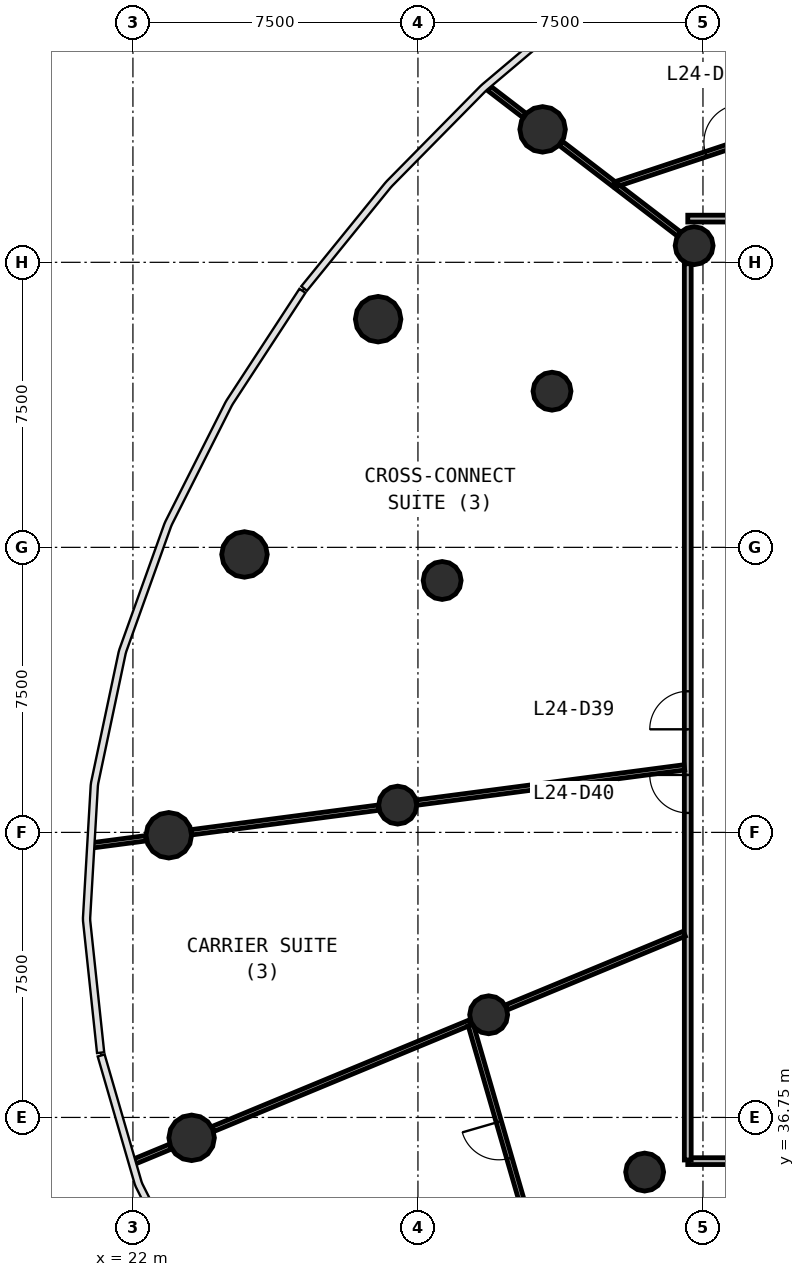
"""IFC4 building model, lengths in metres.
Left out: names, types, materials, properties, quantities, classifications, styles, units other than length and angle.
Written with IfcOpenShell. Run it as: python <this file> out.ifc"""

import sys

from ifc_helpers import new_model, si_unit, direction, frame, frame_2d, origin, origin_2d, place, context, subcontext, project, spatial, rectangle, circle, extrude, source, transform, mapped, element, fill, save


model = new_model("IFC4")
c1 = context("Model", 3, precision=1e-05, world=origin(), true_north=direction((0.0, 1.0)))
c2 = subcontext(c1, "Body", "Model", "MODEL_VIEW")
j1 = project(units=[si_unit("LENGTHUNIT", "METRE"), si_unit("PLANEANGLEUNIT", "RADIAN")], contexts=[c1])
p1 = place(None, origin())
s1 = spatial("IfcSite", under=j1, at=p1, CompositionType="ELEMENT")
p2 = place(p1, origin())
s2 = spatial("IfcBuilding", under=s1, at=p2, CompositionType="ELEMENT")
p3 = place(p2, frame((0.0, 0.0, 104.4)))
s3 = spatial("IfcBuildingStorey", under=s2, at=p3, CompositionType="ELEMENT", Elevation=104.4)
m1 = source(origin(), c2, "Body", "SweptSolid", [
    extrude(circle(Radius=0.6, at=origin_2d()), origin(), (0.0, 0.0, 1.0), 4.1),
])
for number, where, z_axis, x_axis in (
    (1, (32.78, 62.748, 0.0), (0.0, 0.0, 1.0), (1.0, 0.0, 0.0)),
    (2, (28.452, 57.754, 0.0), (0.0, 0.0, 1.0), (1.0, 0.0, 0.0)),
    (3, (24.936, 51.563, 0.0), (0.0, 0.0, 1.0), (1.0, 0.0, 0.0)),
    (4, (22.944, 44.175, 0.0), (0.0, 0.0, 1.0), (1.0, 0.0, 0.0)),
    (5, (23.544, 36.213, 0.0), (0.0, 0.0, 1.0), (1.0, 0.0, 0.0)),
):
    element("IfcColumn", number, at=place(p3, frame(where, z_axis=z_axis, x_axis=x_axis)), inside=s3, PredefinedType="COLUMN", context=c2, shape_type="MappedRepresentation", body=[
        mapped(m1, transform((0.0, 0.0, 0.0), scale=1.0)),
    ])
m2 = source(origin(), c2, "Body", "SweptSolid", [
    extrude(circle(Radius=0.5, at=origin_2d()), origin(), (0.0, 0.0, 1.0), 4.1),
])
for number, where, z_axis, x_axis in (
    (6, (36.768, 59.688, 0.0), (0.0, 0.0, 1.0), (1.0, 0.0, 0.0)),
    (7, (33.028, 55.859, 0.0), (0.0, 0.0, 1.0), (1.0, 0.0, 0.0)),
    (8, (30.137, 50.878, 0.0), (0.0, 0.0, 1.0), (1.0, 0.0, 0.0)),
    (9, (28.966, 44.968, 0.0), (0.0, 0.0, 1.0), (1.0, 0.0, 0.0)),
    (10, (31.361, 39.451, 0.0), (0.0, 0.0, 1.0), (1.0, 0.0, 0.0)),
    (11, (35.465, 35.312, 0.0), (0.0, 0.0, 1.0), (1.0, 0.0, 0.0)),
):
    element("IfcColumn", number, at=place(p3, frame(where, z_axis=z_axis, x_axis=x_axis)), inside=s3, PredefinedType="COLUMN", context=c2, shape_type="MappedRepresentation", body=[
        mapped(m2, transform((0.0, 0.0, 0.0), scale=1.0)),
    ])
p4 = place(p3, frame((67.4, 35.6, 0.0), z_axis=(0.0, 0.0, 1.0), x_axis=(-1.0, 0.0, 0.0)))
e12 = element("IfcWall", 12, at=p4, inside=s3, PredefinedType="PARTITIONING", context=c2, shape_type="SweptSolid", body=[
    extrude(rectangle(XDim=30.8, YDim=0.18, at=frame_2d((15.4, 0.0))), origin(), (0.0, 0.0, 1.0), 2.9),
])
p5 = place(p4, frame((9.05, 0.0, 0.0)))
e13 = element("IfcOpeningElement", 13, at=p5, cuts=e12, PredefinedType="OPENING", context=c2, shape_type="SweptSolid", body=[
    extrude(rectangle(XDim=0.9, YDim=2.1, at=frame_2d((0.45, 1.05))), frame((0.0, 0.1, 0.0), z_axis=(0.0, -1.0, 0.0), x_axis=(1.0, 0.0, 0.0)), (0.0, 0.0, 1.0), 0.2),
])
p6 = place(p4, frame((6.05, 0.0, 0.0)))
e14 = element("IfcOpeningElement", 14, at=p6, cuts=e12, PredefinedType="OPENING", context=c2, shape_type="SweptSolid", body=[
    extrude(rectangle(XDim=0.9, YDim=2.1, at=frame_2d((0.45, 1.05))), frame((0.0, 0.1, 0.0), z_axis=(0.0, -1.0, 0.0), x_axis=(1.0, 0.0, 0.0)), (0.0, 0.0, 1.0), 0.2),
])
p7 = place(p4, frame((2.45, 0.0, 0.0)))
e15 = element("IfcOpeningElement", 15, at=p7, cuts=e12, PredefinedType="OPENING", context=c2, shape_type="SweptSolid", body=[
    extrude(rectangle(XDim=0.9, YDim=2.1, at=frame_2d((0.45, 1.05))), frame((0.0, 0.1, 0.0), z_axis=(0.0, -1.0, 0.0), x_axis=(1.0, 0.0, 0.0)), (0.0, 0.0, 1.0), 0.2),
])
p8 = place(p4, frame((20.95, 0.0, 0.0)))
e16 = element("IfcOpeningElement", 16, at=p8, cuts=e12, PredefinedType="OPENING", context=c2, shape_type="SweptSolid", body=[
    extrude(rectangle(XDim=1.0, YDim=2.1, at=frame_2d((0.5, 1.05))), frame((0.0, 0.1, 0.0), z_axis=(0.0, -1.0, 0.0), x_axis=(1.0, 0.0, 0.0)), (0.0, 0.0, 1.0), 0.2),
])
p9 = place(p4, frame((14.95, 0.0, 0.0)))
e17 = element("IfcOpeningElement", 17, at=p9, cuts=e12, PredefinedType="OPENING", context=c2, shape_type="SweptSolid", body=[
    extrude(rectangle(XDim=1.0, YDim=2.1, at=frame_2d((0.5, 1.05))), frame((0.0, 0.1, 0.0), z_axis=(0.0, -1.0, 0.0), x_axis=(1.0, 0.0, 0.0)), (0.0, 0.0, 1.0), 0.2),
])
p10 = place(p4, frame((12.55, 0.0, 0.0)))
e18 = element("IfcOpeningElement", 18, at=p10, cuts=e12, PredefinedType="OPENING", context=c2, shape_type="SweptSolid", body=[
    extrude(rectangle(XDim=1.0, YDim=2.1, at=frame_2d((0.5, 1.05))), frame((0.0, 0.1, 0.0), z_axis=(0.0, -1.0, 0.0), x_axis=(1.0, 0.0, 0.0)), (0.0, 0.0, 1.0), 0.2),
])
p11 = place(p3, frame((36.6, 60.4, 0.0), z_axis=(0.0, 0.0, 1.0), x_axis=(1.0, 0.0, 0.0)))
e19 = element("IfcWall", 19, at=p11, inside=s3, PredefinedType="PARTITIONING", context=c2, shape_type="SweptSolid", body=[
    extrude(rectangle(XDim=30.8, YDim=0.18, at=frame_2d((15.4, 0.0))), origin(), (0.0, 0.0, 1.0), 2.9),
])
p12 = place(p11, frame((25.55, 0.0, 0.0)))
e20 = element("IfcOpeningElement", 20, at=p12, cuts=e19, PredefinedType="OPENING", context=c2, shape_type="SweptSolid", body=[
    extrude(rectangle(XDim=1.0, YDim=2.1, at=frame_2d((0.5, 1.05))), frame((0.0, 0.1, 0.0), z_axis=(0.0, -1.0, 0.0), x_axis=(1.0, 0.0, 0.0)), (0.0, 0.0, 1.0), 0.2),
])
p13 = place(p11, frame((20.95, 0.0, 0.0)))
e21 = element("IfcOpeningElement", 21, at=p13, cuts=e19, PredefinedType="OPENING", context=c2, shape_type="SweptSolid", body=[
    extrude(rectangle(XDim=1.0, YDim=2.1, at=frame_2d((0.5, 1.05))), frame((0.0, 0.1, 0.0), z_axis=(0.0, -1.0, 0.0), x_axis=(1.0, 0.0, 0.0)), (0.0, 0.0, 1.0), 0.2),
])
p14 = place(p11, frame((14.95, 0.0, 0.0)))
e22 = element("IfcOpeningElement", 22, at=p14, cuts=e19, PredefinedType="OPENING", context=c2, shape_type="SweptSolid", body=[
    extrude(rectangle(XDim=1.0, YDim=2.1, at=frame_2d((0.5, 1.05))), frame((0.0, 0.1, 0.0), z_axis=(0.0, -1.0, 0.0), x_axis=(1.0, 0.0, 0.0)), (0.0, 0.0, 1.0), 0.2),
])
p15 = place(p11, frame((8.95, 0.0, 0.0)))
e23 = element("IfcOpeningElement", 23, at=p15, cuts=e19, PredefinedType="OPENING", context=c2, shape_type="SweptSolid", body=[
    extrude(rectangle(XDim=1.0, YDim=2.1, at=frame_2d((0.5, 1.05))), frame((0.0, 0.1, 0.0), z_axis=(0.0, -1.0, 0.0), x_axis=(1.0, 0.0, 0.0)), (0.0, 0.0, 1.0), 0.2),
])
p16 = place(p3, frame((36.6, 35.63, 0.0), z_axis=(0.0, 0.0, 1.0), x_axis=(0.0, 1.0, 0.0)))
e24 = element("IfcWall", 24, at=p16, inside=s3, PredefinedType="PARTITIONING", context=c2, shape_type="SweptSolid", body=[
    extrude(rectangle(XDim=23.583, YDim=0.18, at=frame_2d((11.791, 0.0))), origin(), (0.0, 0.0, 1.0), 2.9),
])
p17 = place(p16, frame((11.333, 0.0, 0.0)))
e25 = element("IfcOpeningElement", 25, at=p17, cuts=e24, PredefinedType="OPENING", context=c2, shape_type="SweptSolid", body=[
    extrude(rectangle(XDim=1.0, YDim=2.1, at=frame_2d((0.5, 1.05))), frame((0.0, 0.1, 0.0), z_axis=(0.0, -1.0, 0.0), x_axis=(1.0, 0.0, 0.0)), (0.0, 0.0, 1.0), 0.2),
])
p18 = place(p16, frame((9.133, 0.0, 0.0)))
e26 = element("IfcOpeningElement", 26, at=p18, cuts=e24, PredefinedType="OPENING", context=c2, shape_type="SweptSolid", body=[
    extrude(rectangle(XDim=1.0, YDim=2.1, at=frame_2d((0.5, 1.05))), frame((0.0, 0.1, 0.0), z_axis=(0.0, -1.0, 0.0), x_axis=(1.0, 0.0, 0.0)), (0.0, 0.0, 1.0), 0.2),
])
p19 = place(p3, frame((30.87, 39.248, 0.0), z_axis=(0.0, 0.0, 1.0), x_axis=(-0.923871790576, -0.382702122514, 0.0)))
e27 = element("IfcWall", 27, at=p19, inside=s3, PredefinedType="PARTITIONING", context=c2, shape_type="SweptSolid", body=[
    extrude(rectangle(XDim=7.324, YDim=0.14, at=frame_2d((3.662, 0.0))), origin(), (0.0, 0.0, 1.0), 2.9),
])
p20 = place(p3, frame((36.51, 45.961, 0.0), z_axis=(0.0, 0.0, 1.0), x_axis=(-0.99144622305, -0.130515848849, 0.0)))
e28 = element("IfcWall", 28, at=p20, inside=s3, PredefinedType="PARTITIONING", context=c2, shape_type="SweptSolid", body=[
    extrude(rectangle(XDim=7.104, YDim=0.14, at=frame_2d((3.552, 0.0))), origin(), (0.0, 0.0, 1.0), 2.9),
])
p21 = place(p3, frame((32.631, 33.173, 0.0), z_axis=(0.0, 0.0, 1.0), x_axis=(-0.278343340878, 0.960481641984, 0.0)))
e29 = element("IfcWall", 29, at=p21, inside=s3, PredefinedType="PARTITIONING", context=c2, shape_type="SweptSolid", body=[
    extrude(rectangle(XDim=6.255, YDim=0.14, at=frame_2d((3.127, 0.0))), origin(), (0.0, 0.0, 1.0), 2.9),
])
p22 = place(p21, frame((2.604, 0.0, 0.0)))
e30 = element("IfcOpeningElement", 30, at=p22, cuts=e29, PredefinedType="OPENING", context=c2, shape_type="SweptSolid", body=[
    extrude(rectangle(XDim=1.0, YDim=2.1, at=frame_2d((0.5, 1.05))), frame((0.0, 0.08, 0.0), z_axis=(0.0, -1.0, 0.0), x_axis=(1.0, 0.0, 0.0)), (0.0, 0.0, 1.0), 0.16),
])
p23 = place(p3, frame((34.675, 61.294, 0.0), z_axis=(0.0, 0.0, 1.0), x_axis=(0.948817917671, 0.315823620247, 0.0)))
e31 = element("IfcWall", 31, at=p23, inside=s3, PredefinedType="PARTITIONING", context=c2, shape_type="SweptSolid", body=[
    extrude(rectangle(XDim=5.981, YDim=0.14, at=frame_2d((2.99, 0.0))), origin(), (0.0, 0.0, 1.0), 2.9),
])
p24 = place(p23, frame((2.531, 0.0, 0.0)))
e32 = element("IfcOpeningElement", 32, at=p24, cuts=e31, PredefinedType="OPENING", context=c2, shape_type="SweptSolid", body=[
    extrude(rectangle(XDim=1.0, YDim=2.1, at=frame_2d((0.5, 1.05))), frame((0.0, 0.08, 0.0), z_axis=(0.0, -1.0, 0.0), x_axis=(1.0, 0.0, 0.0)), (0.0, 0.0, 1.0), 0.16),
])
p25 = place(p3, frame((36.51, 41.584, 0.0), z_axis=(0.0, 0.0, 1.0), x_axis=(-0.923890025086, -0.382658100067, 0.0)))
e33 = element("IfcWall", 33, at=p25, inside=s3, PredefinedType="PARTITIONING", context=c2, shape_type="SweptSolid", body=[
    extrude(rectangle(XDim=5.068, YDim=0.14, at=frame_2d((2.534, 0.0))), origin(), (0.0, 0.0, 1.0), 2.9),
])
p26 = place(p3, frame((28.466, 44.902, 0.0), z_axis=(0.0, 0.0, 1.0), x_axis=(-0.991443414541, -0.130537181533, 0.0)))
e34 = element("IfcWall", 34, at=p26, inside=s3, PredefinedType="PARTITIONING", context=c2, shape_type="SweptSolid", body=[
    extrude(rectangle(XDim=4.966, YDim=0.14, at=frame_2d((2.483, 0.0))), origin(), (0.0, 0.0, 1.0), 2.9),
])
p27 = place(p3, frame((36.367, 59.995, 0.0), z_axis=(0.0, 0.0, 1.0), x_axis=(-0.793389614633, 0.608714152449, 0.0)))
e35 = element("IfcWall", 35, at=p27, inside=s3, PredefinedType="PARTITIONING", context=c2, shape_type="SweptSolid", body=[
    extrude(rectangle(XDim=2.049, YDim=0.14, at=frame_2d((1.024, 0.0))), origin(), (0.0, 0.0, 1.0), 2.9),
])
p28 = place(p3, frame((34.651, 61.312, 0.0), z_axis=(0.0, 0.0, 1.0), x_axis=(-0.793368751306, 0.608741344456, 0.0)))
e36 = element("IfcWall", 36, at=p28, inside=s3, PredefinedType="PARTITIONING", context=c2, shape_type="SweptSolid", body=[
    extrude(rectangle(XDim=1.753, YDim=0.14, at=frame_2d((0.877, 0.0))), origin(), (0.0, 0.0, 1.0), 2.9),
])
p29 = place(p3, frame((22.344, 44.096, 0.0), z_axis=(0.0, 0.0, 1.0), x_axis=(-0.991440859851, -0.130556583206, 0.0)))
e37 = element("IfcWall", 37, at=p29, inside=s3, PredefinedType="PARTITIONING", context=c2, shape_type="SweptSolid", body=[
    extrude(rectangle(XDim=1.423, YDim=0.14, at=frame_2d((0.711, 0.0))), origin(), (0.0, 0.0, 1.0), 2.9),
])
p30 = place(p3, frame((32.301, 63.116, 0.0), z_axis=(0.0, 0.0, 1.0), x_axis=(-0.793332880396, 0.608788091935, 0.0)))
e38 = element("IfcWall", 38, at=p30, inside=s3, PredefinedType="PARTITIONING", context=c2, shape_type="SweptSolid", body=[
    extrude(rectangle(XDim=1.164, YDim=0.14, at=frame_2d((0.582, 0.0))), origin(), (0.0, 0.0, 1.0), 2.9),
])
p31 = place(p3, frame((22.986, 35.982, 0.0), z_axis=(0.0, 0.0, 1.0), x_axis=(-0.923909071339, -0.38261211154, 0.0)))
e39 = element("IfcWall", 39, at=p31, inside=s3, PredefinedType="PARTITIONING", context=c2, shape_type="SweptSolid", body=[
    extrude(rectangle(XDim=1.021, YDim=0.14, at=frame_2d((0.511, 0.0))), origin(), (0.0, 0.0, 1.0), 2.9),
])
m3 = source(origin(), c2, "Body", "SweptSolid", [
    extrude(rectangle(XDim=1.0, YDim=2.1, at=frame_2d((0.5, 1.05))), frame((0.0, 0.025, 0.0), z_axis=(0.0, -1.0, 0.0), x_axis=(1.0, 0.0, 0.0)), (0.0, 0.0, 1.0), 0.05),
])
p32 = place(p24, origin())
e40 = element("IfcDoor", 40, at=p32, inside=s3, OperationType="SINGLE_SWING_RIGHT", PredefinedType="DOOR", context=c2, shape_type="MappedRepresentation", body=[
    mapped(m3, transform((0.0, 0.0, 0.0), scale=1.0)),
])
fill(e32, e40)
p33 = place(p17, origin())
e41 = element("IfcDoor", 41, at=p33, inside=s3, OperationType="SINGLE_SWING_LEFT", PredefinedType="DOOR", context=c2, shape_type="MappedRepresentation", body=[
    mapped(m3, transform((0.0, 0.0, 0.0), scale=1.0)),
])
fill(e25, e41)
p34 = place(p18, origin())
e42 = element("IfcDoor", 42, at=p34, inside=s3, OperationType="SINGLE_SWING_RIGHT", PredefinedType="DOOR", context=c2, shape_type="MappedRepresentation", body=[
    mapped(m3, transform((0.0, 0.0, 0.0), scale=1.0)),
])
fill(e26, e42)
p35 = place(p22, origin())
e43 = element("IfcDoor", 43, at=p35, inside=s3, OperationType="SINGLE_SWING_RIGHT", PredefinedType="DOOR", context=c2, shape_type="MappedRepresentation", body=[
    mapped(m3, transform((0.0, 0.0, 0.0), scale=1.0)),
])
fill(e30, e43)
save(model, sys.argv[1])
